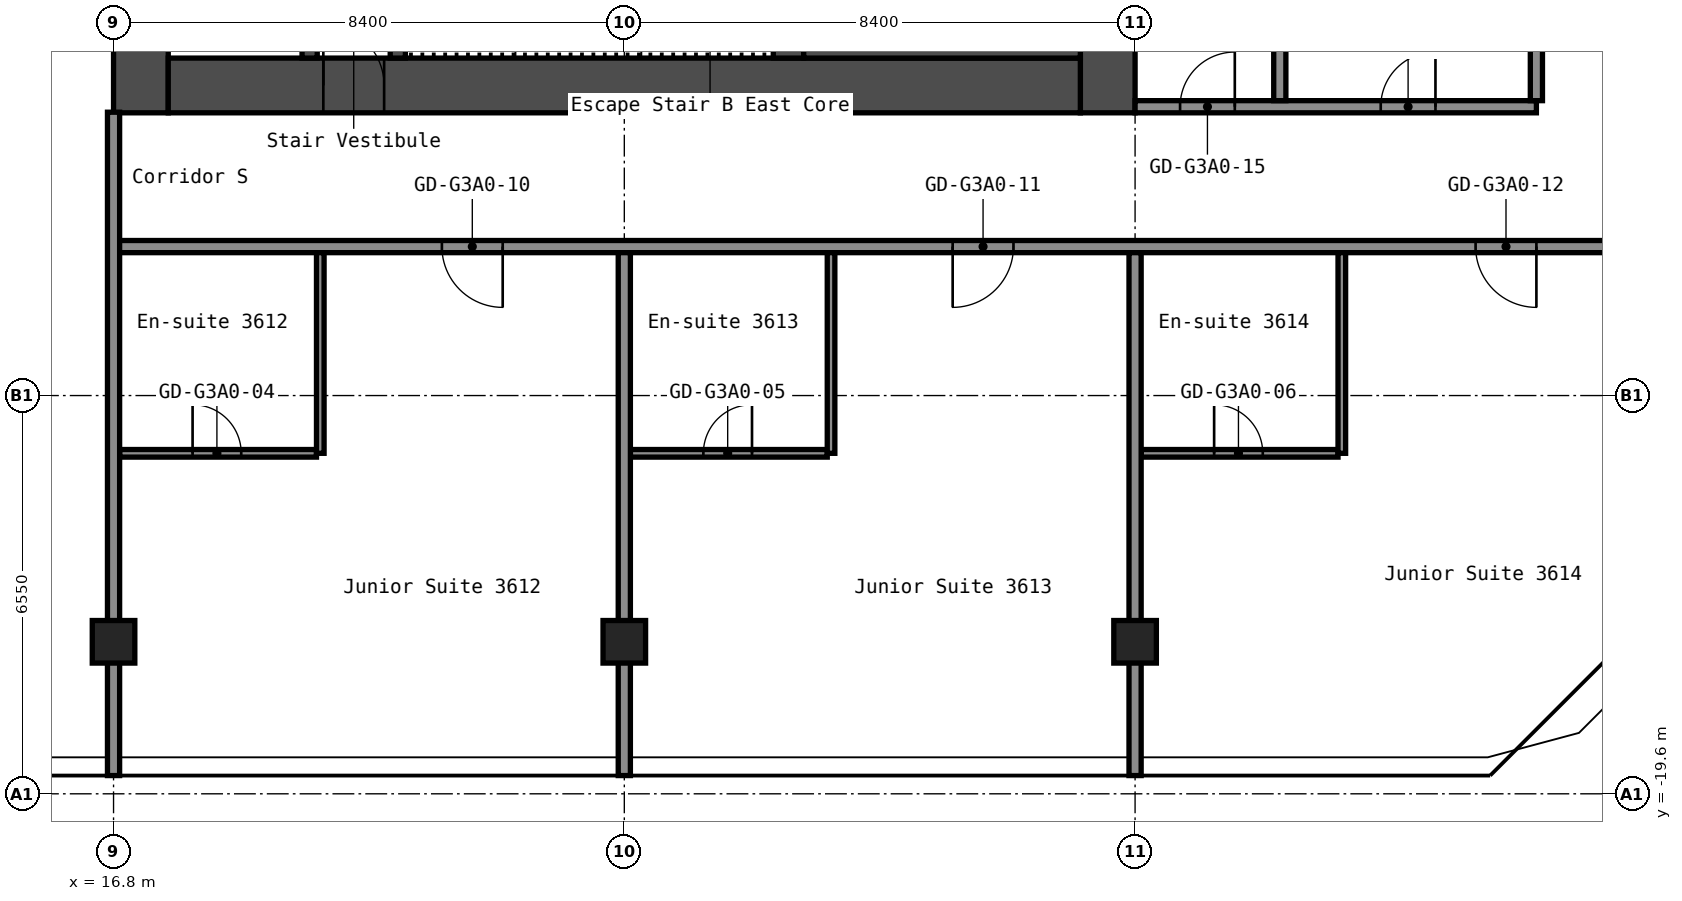
"""IFC4 building model, lengths in metres.
Left out: names, types, materials, properties, quantities, classifications, styles, units other than length and angle.
Written with IfcOpenShell. Run it as: python <this file> out.ifc"""

import sys

from ifc_helpers import new_model, si_unit, direction, frame, frame_2d, origin, origin_2d, place, context, subcontext, project, spatial, rectangle, hollow_rectangle, extrude, element, fill, save


model = new_model("IFC4")
c1 = context("Model", 3, precision=1e-05, world=origin(), true_north=direction((0.0, 1.0)))
c2 = subcontext(c1, "Body", "Model", "MODEL_VIEW")
j1 = project(units=[si_unit("LENGTHUNIT", "METRE"), si_unit("PLANEANGLEUNIT", "RADIAN")], contexts=[c1])
p1 = place(None, origin())
s1 = spatial("IfcSite", under=j1, at=p1, CompositionType="ELEMENT")
p2 = place(p1, origin())
s2 = spatial("IfcBuilding", under=s1, at=p2, CompositionType="ELEMENT")
p3 = place(p2, frame((0.0, 0.0, 131.0)))
s3 = spatial("IfcBuildingStorey", under=s2, at=p3, CompositionType="ELEMENT", Elevation=131.0)
for number, where, z_axis, x_axis in (
    (1, (16.8, -17.1, 0.0), (0.0, 0.0, 1.0), (1.0, 0.0, 0.0)),
    (2, (25.2, -17.1, 0.0), (0.0, 0.0, 1.0), (1.0, 0.0, 0.0)),
    (3, (33.6, -17.1, 0.0), (0.0, 0.0, 1.0), (1.0, 0.0, 0.0)),
):
    element("IfcColumn", number, at=place(p3, frame(where, z_axis=z_axis, x_axis=x_axis)), inside=s3, PredefinedType="COLUMN", context=c2, shape_type="SweptSolid", body=[
        extrude(hollow_rectangle(XDim=0.7, YDim=0.7, WallThickness=0.028, at=origin_2d()), origin(), (0.0, 0.0, 1.0), 2.75),
    ])
p4 = place(p3, frame((17.25, -8.4, 0.0), z_axis=(0.0, 0.0, 1.0), x_axis=(0.0, 1.0, 0.0)))
e4 = element("IfcWall", 4, at=p4, inside=s3, PredefinedType="SHEAR", context=c2, shape_type="SweptSolid", body=[
    extrude(rectangle(XDim=16.8, YDim=0.9, at=frame_2d((8.4, 0.0))), origin(), (0.0, 0.0, 1.0), 2.75),
])
p5 = place(p4, frame((7.1, 0.0, 0.0)))
e5 = element("IfcOpeningElement", 5, at=p5, cuts=e4, PredefinedType="OPENING", context=c2, shape_type="SweptSolid", body=[
    extrude(rectangle(XDim=1.6, YDim=2.1, at=frame_2d((0.8, 1.05))), frame((0.0, 0.46, 0.0), z_axis=(0.0, -1.0, 0.0), x_axis=(1.0, 0.0, 0.0)), (0.0, 0.0, 1.0), 0.92),
])
p6 = place(p3, frame((33.15, -8.4, 0.0), z_axis=(0.0, 0.0, 1.0), x_axis=(0.0, 1.0, 0.0)))
e6 = element("IfcWall", 6, at=p6, inside=s3, PredefinedType="SHEAR", context=c2, shape_type="SweptSolid", body=[
    extrude(rectangle(XDim=16.8, YDim=0.9, at=frame_2d((8.4, 0.0))), origin(), (0.0, 0.0, 1.0), 2.75),
])
p7 = place(p3, frame((17.7, -7.95, 0.0), z_axis=(0.0, 0.0, 1.0), x_axis=(1.0, 0.0, 0.0)))
e7 = element("IfcWall", 7, at=p7, inside=s3, PredefinedType="SHEAR", context=c2, shape_type="SweptSolid", body=[
    extrude(rectangle(XDim=15.0, YDim=0.9, at=frame_2d((7.5, 0.0))), origin(), (0.0, 0.0, 1.0), 2.75),
])
p8 = place(p7, frame((2.55, 0.0, 0.0)))
e8 = element("IfcOpeningElement", 8, at=p8, cuts=e7, PredefinedType="OPENING", context=c2, shape_type="SweptSolid", body=[
    extrude(rectangle(XDim=1.0, YDim=2.1, at=frame_2d((0.5, 1.05))), frame((0.0, 0.46, 0.0), z_axis=(0.0, -1.0, 0.0), x_axis=(1.0, 0.0, 0.0)), (0.0, 0.0, 1.0), 0.92),
])
p9 = place(p3, frame((20.025, -7.5, 0.0), z_axis=(0.0, 0.0, 1.0), x_axis=(0.0, 1.0, 0.0)))
e9 = element("IfcWall", 9, at=p9, inside=s3, PredefinedType="SHEAR", context=c2, shape_type="SweptSolid", body=[
    extrude(rectangle(XDim=6.3, YDim=0.25, at=frame_2d((3.15, 0.0))), origin(), (0.0, 0.0, 1.0), 2.75),
])
p10 = place(p9, frame((2.4, 0.0, 0.0)))
e10 = element("IfcOpeningElement", 10, at=p10, cuts=e9, PredefinedType="OPENING", context=c2, shape_type="SweptSolid", body=[
    extrude(rectangle(XDim=1.0, YDim=2.1, at=frame_2d((0.5, 1.05))), frame((0.0, 0.135, 0.0), z_axis=(0.0, -1.0, 0.0), x_axis=(1.0, 0.0, 0.0)), (0.0, 0.0, 1.0), 0.27),
])
p11 = place(p3, frame((21.475, -7.5, 0.0), z_axis=(0.0, 0.0, 1.0), x_axis=(0.0, 1.0, 0.0)))
e11 = element("IfcWall", 11, at=p11, inside=s3, PredefinedType="SHEAR", context=c2, shape_type="SweptSolid", body=[
    extrude(rectangle(XDim=3.75, YDim=0.25, at=frame_2d((1.875, 0.0))), origin(), (0.0, 0.0, 1.0), 2.75),
])
p12 = place(p11, frame((1.3, 0.0, 0.0)))
e12 = element("IfcOpeningElement", 12, at=p12, cuts=e11, PredefinedType="OPENING", context=c2, shape_type="SweptSolid", body=[
    extrude(rectangle(XDim=1.2, YDim=2.1, at=frame_2d((0.6, 1.05))), frame((0.0, 0.135, 0.0), z_axis=(0.0, -1.0, 0.0), x_axis=(1.0, 0.0, 0.0)), (0.0, 0.0, 1.0), 0.27),
])
p13 = place(p3, frame((27.9, -7.5, 0.0), z_axis=(0.0, 0.0, 1.0), x_axis=(0.0, 1.0, 0.0)))
e13 = element("IfcWall", 13, at=p13, inside=s3, PredefinedType="SHEAR", context=c2, shape_type="SweptSolid", body=[
    extrude(rectangle(XDim=3.75, YDim=0.5, at=frame_2d((1.875, 0.0))), origin(), (0.0, 0.0, 1.0), 2.75),
])
p14 = place(p3, frame((28.15, -6.75, 0.0), z_axis=(0.0, 0.0, 1.0), x_axis=(1.0, 0.0, 0.0)))
e14 = element("IfcWall", 14, at=p14, inside=s3, PredefinedType="SHEAR", context=c2, shape_type="SweptSolid", body=[
    extrude(rectangle(XDim=4.55, YDim=1.5, at=frame_2d((2.275, 0.0))), origin(), (0.0, 0.0, 1.0), 2.75),
])
p15 = place(p3, frame((16.9, -14.0, 0.0), z_axis=(0.0, 0.0, 1.0), x_axis=(1.0, 0.0, 0.0)))
e15 = element("IfcWall", 15, at=p15, inside=s3, PredefinedType="PARTITIONING", context=c2, shape_type="SweptSolid", body=[
    extrude(rectangle(XDim=3.238, YDim=0.125, at=frame_2d((1.619, 0.0))), origin(), (0.0, 0.0, 1.0), 2.75),
])
p16 = place(p15, frame((1.2, 0.0, 0.0)))
e16 = element("IfcOpeningElement", 16, at=p16, cuts=e15, PredefinedType="OPENING", context=c2, shape_type="SweptSolid", body=[
    extrude(rectangle(XDim=0.8, YDim=2.1, at=frame_2d((0.4, 1.05))), frame((0.0, 0.073, 0.0), z_axis=(0.0, -1.0, 0.0), x_axis=(1.0, 0.0, 0.0)), (0.0, 0.0, 1.0), 0.145),
])
p17 = place(p3, frame((25.3, -14.0, 0.0), z_axis=(0.0, 0.0, 1.0), x_axis=(1.0, 0.0, 0.0)))
e17 = element("IfcWall", 17, at=p17, inside=s3, PredefinedType="PARTITIONING", context=c2, shape_type="SweptSolid", body=[
    extrude(rectangle(XDim=3.238, YDim=0.125, at=frame_2d((1.619, 0.0))), origin(), (0.0, 0.0, 1.0), 2.75),
])
p18 = place(p17, frame((1.2, 0.0, 0.0)))
e18 = element("IfcOpeningElement", 18, at=p18, cuts=e17, PredefinedType="OPENING", context=c2, shape_type="SweptSolid", body=[
    extrude(rectangle(XDim=0.8, YDim=2.1, at=frame_2d((0.4, 1.05))), frame((0.0, 0.073, 0.0), z_axis=(0.0, -1.0, 0.0), x_axis=(1.0, 0.0, 0.0)), (0.0, 0.0, 1.0), 0.145),
])
p19 = place(p3, frame((33.7, -14.0, 0.0), z_axis=(0.0, 0.0, 1.0), x_axis=(1.0, 0.0, 0.0)))
e19 = element("IfcWall", 19, at=p19, inside=s3, PredefinedType="PARTITIONING", context=c2, shape_type="SweptSolid", body=[
    extrude(rectangle(XDim=3.238, YDim=0.125, at=frame_2d((1.619, 0.0))), origin(), (0.0, 0.0, 1.0), 2.75),
])
p20 = place(p19, frame((1.2, 0.0, 0.0)))
e20 = element("IfcOpeningElement", 20, at=p20, cuts=e19, PredefinedType="OPENING", context=c2, shape_type="SweptSolid", body=[
    extrude(rectangle(XDim=0.8, YDim=2.1, at=frame_2d((0.4, 1.05))), frame((0.0, 0.073, 0.0), z_axis=(0.0, -1.0, 0.0), x_axis=(1.0, 0.0, 0.0)), (0.0, 0.0, 1.0), 0.145),
])
p21 = place(p3, frame((16.8, -10.6, 0.0), z_axis=(0.0, 0.0, 1.0), x_axis=(1.0, 0.0, 0.0)))
e21 = element("IfcWall", 21, at=p21, inside=s3, PredefinedType="PARTITIONING", context=c2, shape_type="SweptSolid", body=[
    extrude(rectangle(XDim=25.9, YDim=0.2, at=frame_2d((12.95, 0.0))), origin(), (0.0, 0.0, 1.0), 2.75),
])
p22 = place(p21, frame((5.4, 0.0, 0.0)))
e22 = element("IfcOpeningElement", 22, at=p22, cuts=e21, PredefinedType="OPENING", context=c2, shape_type="SweptSolid", body=[
    extrude(rectangle(XDim=1.0, YDim=2.1, at=frame_2d((0.5, 1.05))), frame((0.0, 0.11, 0.0), z_axis=(0.0, -1.0, 0.0), x_axis=(1.0, 0.0, 0.0)), (0.0, 0.0, 1.0), 0.22),
])
p23 = place(p21, frame((13.8, 0.0, 0.0)))
e23 = element("IfcOpeningElement", 23, at=p23, cuts=e21, PredefinedType="OPENING", context=c2, shape_type="SweptSolid", body=[
    extrude(rectangle(XDim=1.0, YDim=2.1, at=frame_2d((0.5, 1.05))), frame((0.0, 0.11, 0.0), z_axis=(0.0, -1.0, 0.0), x_axis=(1.0, 0.0, 0.0)), (0.0, 0.0, 1.0), 0.22),
])
p24 = place(p21, frame((22.4, 0.0, 0.0)))
e24 = element("IfcOpeningElement", 24, at=p24, cuts=e21, PredefinedType="OPENING", context=c2, shape_type="SweptSolid", body=[
    extrude(rectangle(XDim=1.0, YDim=2.1, at=frame_2d((0.5, 1.05))), frame((0.0, 0.11, 0.0), z_axis=(0.0, -1.0, 0.0), x_axis=(1.0, 0.0, 0.0)), (0.0, 0.0, 1.0), 0.22),
])
p25 = place(p3, frame((33.6, -8.3, 0.0), z_axis=(0.0, 0.0, 1.0), x_axis=(1.0, 0.0, 0.0)))
e25 = element("IfcWall", 25, at=p25, inside=s3, PredefinedType="PARTITIONING", context=c2, shape_type="SweptSolid", body=[
    extrude(rectangle(XDim=6.6, YDim=0.2, at=frame_2d((3.3, 0.0))), origin(), (0.0, 0.0, 1.0), 2.75),
])
p26 = place(p25, frame((0.74, 0.0, 0.0)))
e26 = element("IfcOpeningElement", 26, at=p26, cuts=e25, PredefinedType="OPENING", context=c2, shape_type="SweptSolid", body=[
    extrude(rectangle(XDim=0.9, YDim=2.1, at=frame_2d((0.45, 1.05))), frame((0.0, 0.11, 0.0), z_axis=(0.0, -1.0, 0.0), x_axis=(1.0, 0.0, 0.0)), (0.0, 0.0, 1.0), 0.22),
])
p27 = place(p25, frame((4.04, 0.0, 0.0)))
e27 = element("IfcOpeningElement", 27, at=p27, cuts=e25, PredefinedType="OPENING", context=c2, shape_type="SweptSolid", body=[
    extrude(rectangle(XDim=0.9, YDim=2.1, at=frame_2d((0.45, 1.05))), frame((0.0, 0.11, 0.0), z_axis=(0.0, -1.0, 0.0), x_axis=(1.0, 0.0, 0.0)), (0.0, 0.0, 1.0), 0.22),
])
p28 = place(p3, frame((16.8, -19.3, 0.0), z_axis=(0.0, 0.0, 1.0), x_axis=(0.0, 1.0, 0.0)))
e28 = element("IfcWall", 28, at=p28, inside=s3, PredefinedType="PARTITIONING", context=c2, shape_type="SweptSolid", body=[
    extrude(rectangle(XDim=10.91, YDim=0.2, at=frame_2d((5.455, 0.0))), origin(), (0.0, 0.0, 1.0), 2.75),
])
p29 = place(p3, frame((20.2, -14.0, 0.0), z_axis=(0.0, 0.0, 1.0), x_axis=(0.0, 1.0, 0.0)))
e29 = element("IfcWall", 29, at=p29, inside=s3, PredefinedType="PARTITIONING", context=c2, shape_type="SweptSolid", body=[
    extrude(rectangle(XDim=3.3, YDim=0.125, at=frame_2d((1.65, 0.0))), origin(), (0.0, 0.0, 1.0), 2.75),
])
p30 = place(p3, frame((25.2, -19.3, 0.0), z_axis=(0.0, 0.0, 1.0), x_axis=(0.0, 1.0, 0.0)))
e30 = element("IfcWall", 30, at=p30, inside=s3, PredefinedType="PARTITIONING", context=c2, shape_type="SweptSolid", body=[
    extrude(rectangle(XDim=8.6, YDim=0.2, at=frame_2d((4.3, 0.0))), origin(), (0.0, 0.0, 1.0), 2.75),
])
p31 = place(p3, frame((28.6, -14.0, 0.0), z_axis=(0.0, 0.0, 1.0), x_axis=(0.0, 1.0, 0.0)))
e31 = element("IfcWall", 31, at=p31, inside=s3, PredefinedType="PARTITIONING", context=c2, shape_type="SweptSolid", body=[
    extrude(rectangle(XDim=3.3, YDim=0.125, at=frame_2d((1.65, 0.0))), origin(), (0.0, 0.0, 1.0), 2.75),
])
p32 = place(p3, frame((33.6, -19.3, 0.0), z_axis=(0.0, 0.0, 1.0), x_axis=(0.0, 1.0, 0.0)))
e32 = element("IfcWall", 32, at=p32, inside=s3, PredefinedType="PARTITIONING", context=c2, shape_type="SweptSolid", body=[
    extrude(rectangle(XDim=8.6, YDim=0.2, at=frame_2d((4.3, 0.0))), origin(), (0.0, 0.0, 1.0), 2.75),
])
p33 = place(p3, frame((35.98, -8.2, 0.0), z_axis=(0.0, 0.0, 1.0), x_axis=(0.0, 1.0, 0.0)))
e33 = element("IfcWall", 33, at=p33, inside=s3, PredefinedType="PARTITIONING", context=c2, shape_type="SweptSolid", body=[
    extrude(rectangle(XDim=8.2, YDim=0.2, at=frame_2d((4.1, 0.0))), origin(), (0.0, 0.0, 1.0), 2.75),
])
p34 = place(p3, frame((37.0, -14.0, 0.0), z_axis=(0.0, 0.0, 1.0), x_axis=(0.0, 1.0, 0.0)))
e34 = element("IfcWall", 34, at=p34, inside=s3, PredefinedType="PARTITIONING", context=c2, shape_type="SweptSolid", body=[
    extrude(rectangle(XDim=3.3, YDim=0.125, at=frame_2d((1.65, 0.0))), origin(), (0.0, 0.0, 1.0), 2.75),
])
p35 = place(p3, frame((40.2, -8.2, 0.0), z_axis=(0.0, 0.0, 1.0), x_axis=(0.0, 1.0, 0.0)))
e35 = element("IfcWall", 35, at=p35, inside=s3, PredefinedType="PARTITIONING", context=c2, shape_type="SweptSolid", body=[
    extrude(rectangle(XDim=16.4, YDim=0.2, at=frame_2d((8.2, 0.0))), origin(), (0.0, 0.0, 1.0), 2.75),
])
p36 = place(p8, origin())
e36 = element("IfcDoor", 36, at=p36, inside=s3, OperationType="SINGLE_SWING_RIGHT", PredefinedType="DOOR", context=c2, shape_type="SweptSolid", body=[
    extrude(rectangle(XDim=1.0, YDim=2.1, at=frame_2d((0.5, 1.05))), frame((0.0, 0.025, 0.0), z_axis=(0.0, -1.0, 0.0), x_axis=(1.0, 0.0, 0.0)), (0.0, 0.0, 1.0), 0.05),
])
fill(e8, e36)
p37 = place(p16, origin())
e37 = element("IfcDoor", 37, at=p37, inside=s3, OperationType="SINGLE_SWING_RIGHT", PredefinedType="DOOR", context=c2, shape_type="SweptSolid", body=[
    extrude(rectangle(XDim=0.8, YDim=2.1, at=frame_2d((0.4, 1.05))), frame((0.0, 0.025, 0.0), z_axis=(0.0, -1.0, 0.0), x_axis=(1.0, 0.0, 0.0)), (0.0, 0.0, 1.0), 0.05),
])
fill(e16, e37)
p38 = place(p18, origin())
e38 = element("IfcDoor", 38, at=p38, inside=s3, OperationType="SINGLE_SWING_LEFT", PredefinedType="DOOR", context=c2, shape_type="SweptSolid", body=[
    extrude(rectangle(XDim=0.8, YDim=2.1, at=frame_2d((0.4, 1.05))), frame((0.0, 0.025, 0.0), z_axis=(0.0, -1.0, 0.0), x_axis=(1.0, 0.0, 0.0)), (0.0, 0.0, 1.0), 0.05),
])
fill(e18, e38)
p39 = place(p20, origin())
e39 = element("IfcDoor", 39, at=p39, inside=s3, OperationType="SINGLE_SWING_RIGHT", PredefinedType="DOOR", context=c2, shape_type="SweptSolid", body=[
    extrude(rectangle(XDim=0.8, YDim=2.1, at=frame_2d((0.4, 1.05))), frame((0.0, 0.025, 0.0), z_axis=(0.0, -1.0, 0.0), x_axis=(1.0, 0.0, 0.0)), (0.0, 0.0, 1.0), 0.05),
])
fill(e20, e39)
p40 = place(p22, origin())
e40 = element("IfcDoor", 40, at=p40, inside=s3, OperationType="SINGLE_SWING_RIGHT", PredefinedType="DOOR", context=c2, shape_type="SweptSolid", body=[
    extrude(rectangle(XDim=1.0, YDim=2.1, at=frame_2d((0.5, 1.05))), frame((0.0, 0.025, 0.0), z_axis=(0.0, -1.0, 0.0), x_axis=(1.0, 0.0, 0.0)), (0.0, 0.0, 1.0), 0.05),
])
fill(e22, e40)
p41 = place(p23, origin())
e41 = element("IfcDoor", 41, at=p41, inside=s3, OperationType="SINGLE_SWING_LEFT", PredefinedType="DOOR", context=c2, shape_type="SweptSolid", body=[
    extrude(rectangle(XDim=1.0, YDim=2.1, at=frame_2d((0.5, 1.05))), frame((0.0, 0.025, 0.0), z_axis=(0.0, -1.0, 0.0), x_axis=(1.0, 0.0, 0.0)), (0.0, 0.0, 1.0), 0.05),
])
fill(e23, e41)
p42 = place(p24, origin())
e42 = element("IfcDoor", 42, at=p42, inside=s3, OperationType="SINGLE_SWING_RIGHT", PredefinedType="DOOR", context=c2, shape_type="SweptSolid", body=[
    extrude(rectangle(XDim=1.0, YDim=2.1, at=frame_2d((0.5, 1.05))), frame((0.0, 0.025, 0.0), z_axis=(0.0, -1.0, 0.0), x_axis=(1.0, 0.0, 0.0)), (0.0, 0.0, 1.0), 0.05),
])
fill(e24, e42)
p43 = place(p26, origin())
e43 = element("IfcDoor", 43, at=p43, inside=s3, OperationType="SINGLE_SWING_LEFT", PredefinedType="DOOR", context=c2, shape_type="SweptSolid", body=[
    extrude(rectangle(XDim=0.9, YDim=2.1, at=frame_2d((0.45, 1.05))), frame((0.0, 0.025, 0.0), z_axis=(0.0, -1.0, 0.0), x_axis=(1.0, 0.0, 0.0)), (0.0, 0.0, 1.0), 0.05),
])
fill(e26, e43)
p44 = place(p27, origin())
e44 = element("IfcDoor", 44, at=p44, inside=s3, OperationType="SINGLE_SWING_LEFT", PredefinedType="DOOR", context=c2, shape_type="SweptSolid", body=[
    extrude(rectangle(XDim=0.9, YDim=2.1, at=frame_2d((0.45, 1.05))), frame((0.0, 0.025, 0.0), z_axis=(0.0, -1.0, 0.0), x_axis=(1.0, 0.0, 0.0)), (0.0, 0.0, 1.0), 0.05),
])
fill(e27, e44)
save(model, sys.argv[1])
